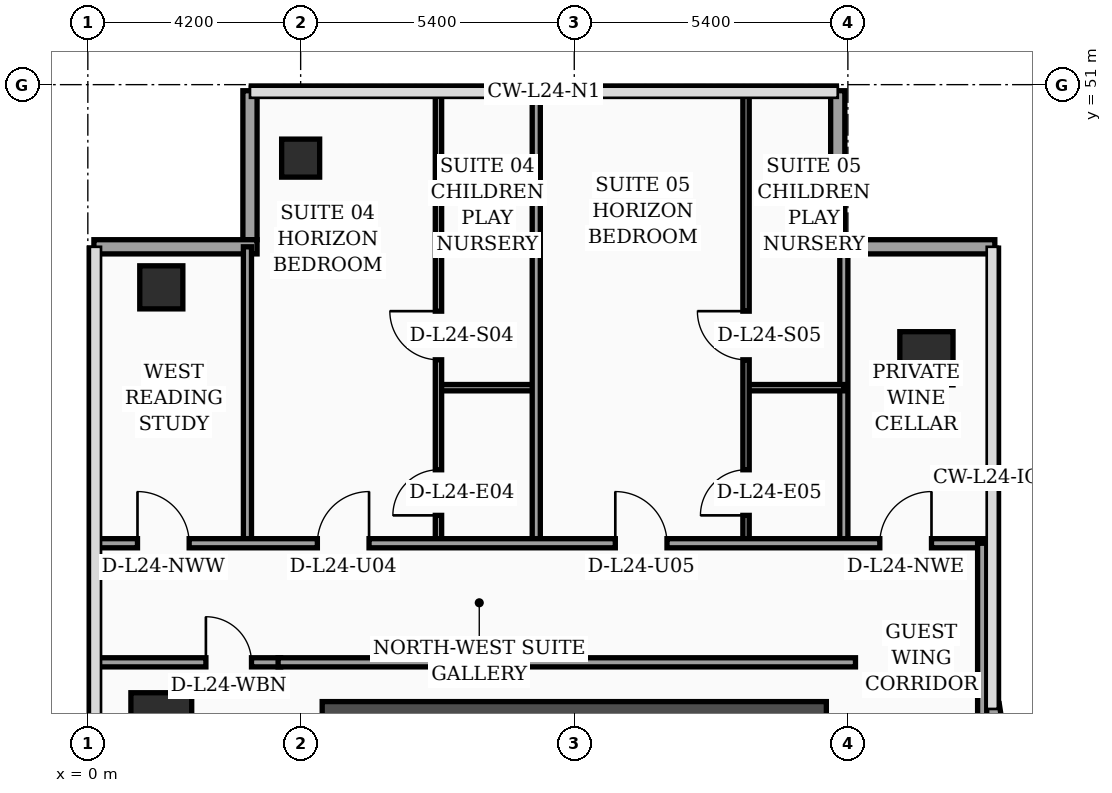
"""IFC4 building model, lengths in metres.
Left out: names, types, materials, properties, quantities, classifications, styles, units other than length and angle.
Written with IfcOpenShell. Run it as: python <this file> out.ifc"""

import sys

from ifc_helpers import new_model, si_unit, direction, frame, frame_2d, origin, origin_2d, place, context, subcontext, project, spatial, rectangle, hollow_rectangle, extrude, element, fill, save


model = new_model("IFC4")
c1 = context("Model", 3, precision=1e-05, world=origin(), true_north=direction((0.0, 1.0)))
c2 = subcontext(c1, "Body", "Model", "MODEL_VIEW")
j1 = project(units=[si_unit("LENGTHUNIT", "METRE"), si_unit("PLANEANGLEUNIT", "RADIAN")], contexts=[c1])
p1 = place(None, origin())
s1 = spatial("IfcSite", under=j1, at=p1, CompositionType="ELEMENT")
p2 = place(p1, origin())
s2 = spatial("IfcBuilding", under=s1, at=p2, CompositionType="ELEMENT")
p3 = place(p2, frame((0.0, 0.0, 101.2)))
s3 = spatial("IfcBuildingStorey", under=s2, at=p3, CompositionType="ELEMENT", Elevation=101.2)
p4 = place(p3, frame((4.625, 38.4, 0.0), z_axis=(0.0, 0.0, 1.0), x_axis=(1.0, 0.0, 0.0)))
e1 = element("IfcWall", 1, at=p4, inside=s3, PredefinedType="SHEAR", context=c2, shape_type="SweptSolid", body=[
    extrude(rectangle(XDim=9.95, YDim=0.85, at=frame_2d((4.975, 0.0))), origin(), (0.0, 0.0, 1.0), 3.56),
])
p5 = place(p3, frame((1.45, 38.4, 0.0), z_axis=(0.0, 0.0, 1.0), x_axis=(1.0, 0.0, 0.0)))
e2 = element("IfcColumn", 2, at=p5, inside=s3, PredefinedType="COLUMN", context=c2, shape_type="SweptSolid", body=[
    extrude(rectangle(XDim=1.2, YDim=1.2, at=origin_2d()), origin(), (0.0, 0.0, 1.0), 3.56),
])
p6 = place(p3, frame((1.45, 47.0, 0.0), z_axis=(0.0, 0.0, 1.0), x_axis=(1.0, 0.0, 0.0)))
e3 = element("IfcColumn", 3, at=p6, inside=s3, PredefinedType="COLUMN", context=c2, shape_type="SweptSolid", body=[
    extrude(hollow_rectangle(XDim=0.85, YDim=0.85, WallThickness=0.036, at=origin_2d()), origin(), (0.0, 0.0, 1.0), 3.56),
])
p7 = place(p3, frame((4.2, 49.55, 0.0), z_axis=(0.0, 0.0, 1.0), x_axis=(1.0, 0.0, 0.0)))
e4 = element("IfcColumn", 4, at=p7, inside=s3, PredefinedType="COLUMN", context=c2, shape_type="SweptSolid", body=[
    extrude(hollow_rectangle(XDim=0.75, YDim=0.75, WallThickness=0.032, at=origin_2d()), origin(), (0.0, 0.0, 1.0), 3.56),
])
p8 = place(p3, frame((16.55, 45.6, 0.0), z_axis=(0.0, 0.0, 1.0), x_axis=(1.0, 0.0, 0.0)))
e5 = element("IfcColumn", 5, at=p8, inside=s3, PredefinedType="COLUMN", context=c2, shape_type="SweptSolid", body=[
    extrude(rectangle(XDim=1.05, YDim=1.05, at=origin_2d()), origin(), (0.0, 0.0, 1.0), 3.56),
])
p9 = place(p3, frame((17.962, 38.03, 0.0), z_axis=(0.0, 0.0, 1.0), x_axis=(-0.15141125477, 0.988470855377, 0.0)))
e6 = element("IfcWall", 6, at=p9, inside=s3, PredefinedType="SOLIDWALL", context=c2, shape_type="SweptSolid", body=[
    extrude(rectangle(XDim=0.739, YDim=0.28, at=frame_2d((0.369, 0.0))), origin(), (0.0, 0.0, 1.0), 3.56),
])
p10 = place(p3, frame((17.9, 47.8, 0.0), z_axis=(0.0, 0.0, 1.0), x_axis=(-1.0, 0.0, 0.0)))
e7 = element("IfcWall", 7, at=p10, inside=s3, PredefinedType="SOLIDWALL", context=c2, shape_type="SweptSolid", body=[
    extrude(rectangle(XDim=3.24, YDim=0.28, at=frame_2d((1.62, 0.0))), origin(), (0.0, 0.0, 1.0), 3.56),
])
p11 = place(p3, frame((14.8, 47.94, 0.0), z_axis=(0.0, 0.0, 1.0), x_axis=(0.0, 1.0, 0.0)))
e8 = element("IfcWall", 8, at=p11, inside=s3, PredefinedType="SOLIDWALL", context=c2, shape_type="SweptSolid", body=[
    extrude(rectangle(XDim=2.94, YDim=0.28, at=frame_2d((1.47, 0.0))), origin(), (0.0, 0.0, 1.0), 3.56),
])
p12 = place(p3, frame((3.2, 50.88, 0.0), z_axis=(0.0, 0.0, 1.0), x_axis=(0.0, -1.0, 0.0)))
e9 = element("IfcWall", 9, at=p12, inside=s3, PredefinedType="SOLIDWALL", context=c2, shape_type="SweptSolid", body=[
    extrude(rectangle(XDim=2.94, YDim=0.28, at=frame_2d((1.47, 0.0))), origin(), (0.0, 0.0, 1.0), 3.04),
])
p13 = place(p3, frame((3.34, 47.8, 0.0), z_axis=(0.0, 0.0, 1.0), x_axis=(-1.0, 0.0, 0.0)))
e10 = element("IfcWall", 10, at=p13, inside=s3, PredefinedType="SOLIDWALL", context=c2, shape_type="SweptSolid", body=[
    extrude(rectangle(XDim=3.22, YDim=0.28, at=frame_2d((1.61, 0.0))), origin(), (0.0, 0.0, 1.0), 3.04),
])
p14 = place(p3, frame((0.08, 39.6, 0.0), z_axis=(0.0, 0.0, 1.0), x_axis=(1.0, 0.0, 0.0)))
e11 = element("IfcWall", 11, at=p14, inside=s3, PredefinedType="PARTITIONING", context=c2, shape_type="SweptSolid", body=[
    extrude(rectangle(XDim=3.725, YDim=0.18, at=frame_2d((1.862, 0.0))), origin(), (0.0, 0.0, 1.0), 2.84),
])
p15 = place(p14, frame((2.25, 0.0, 0.0)))
e12 = element("IfcOpeningElement", 12, at=p15, cuts=e11, PredefinedType="OPENING", context=c2, shape_type="SweptSolid", body=[
    extrude(rectangle(XDim=0.9, YDim=2.15, at=frame_2d((0.45, 1.075))), frame((0.0, 0.1, 0.0), z_axis=(0.0, -1.0, 0.0), x_axis=(1.0, 0.0, 0.0)), (0.0, 0.0, 1.0), 0.2),
])
p16 = place(p3, frame((3.15, 41.95, 0.0), z_axis=(0.0, 0.0, 1.0), x_axis=(0.0, 1.0, 0.0)))
e13 = element("IfcWall", 13, at=p16, inside=s3, PredefinedType="PARTITIONING", context=c2, shape_type="SweptSolid", body=[
    extrude(rectangle(XDim=5.85, YDim=0.16, at=frame_2d((2.925, 0.0))), origin(), (0.0, 0.0, 1.0), 3.14),
])
p17 = place(p3, frame((14.92, 41.95, 0.0), z_axis=(0.0, 0.0, 1.0), x_axis=(0.0, 1.0, 0.0)))
e14 = element("IfcWall", 14, at=p17, inside=s3, PredefinedType="PARTITIONING", context=c2, shape_type="SweptSolid", body=[
    extrude(rectangle(XDim=5.85, YDim=0.16, at=frame_2d((2.925, 0.0))), origin(), (0.0, 0.0, 1.0), 3.04),
])
p18 = place(p3, frame((6.92, 45.02, 0.0), z_axis=(0.0, 0.0, 1.0), x_axis=(1.0, 0.0, 0.0)))
e15 = element("IfcWall", 15, at=p18, inside=s3, PredefinedType="PARTITIONING", context=c2, shape_type="SweptSolid", body=[
    extrude(rectangle(XDim=1.93, YDim=0.125, at=frame_2d((0.965, 0.0))), origin(), (0.0, 0.0, 1.0), 3.56),
])
p19 = place(p3, frame((6.92, 41.95, 0.0), z_axis=(0.0, 0.0, 1.0), x_axis=(0.0, 1.0, 0.0)))
e16 = element("IfcWall", 16, at=p19, inside=s3, PredefinedType="PARTITIONING", context=c2, shape_type="SweptSolid", body=[
    extrude(rectangle(XDim=8.99, YDim=0.125, at=frame_2d((4.495, 0.0))), origin(), (0.0, 0.0, 1.0), 3.04),
])
p20 = place(p19, frame((0.55, 0.0, 0.0)))
e17 = element("IfcOpeningElement", 17, at=p20, cuts=e16, PredefinedType="OPENING", context=c2, shape_type="SweptSolid", body=[
    extrude(rectangle(XDim=0.9, YDim=2.15, at=frame_2d((0.45, 1.075))), frame((0.0, 0.073, 0.0), z_axis=(0.0, -1.0, 0.0), x_axis=(1.0, 0.0, 0.0)), (0.0, 0.0, 1.0), 0.145),
])
p21 = place(p19, frame((3.62, 0.0, 0.0)))
e18 = element("IfcOpeningElement", 18, at=p21, cuts=e16, PredefinedType="OPENING", context=c2, shape_type="SweptSolid", body=[
    extrude(rectangle(XDim=0.96, YDim=2.2, at=frame_2d((0.48, 1.1))), frame((0.0, 0.073, 0.0), z_axis=(0.0, -1.0, 0.0), x_axis=(1.0, 0.0, 0.0)), (0.0, 0.0, 1.0), 0.145),
])
p22 = place(p3, frame((12.99, 45.02, 0.0), z_axis=(0.0, 0.0, 1.0), x_axis=(1.0, 0.0, 0.0)))
e19 = element("IfcWall", 19, at=p22, inside=s3, PredefinedType="PARTITIONING", context=c2, shape_type="SweptSolid", body=[
    extrude(rectangle(XDim=1.93, YDim=0.125, at=frame_2d((0.965, 0.0))), origin(), (0.0, 0.0, 1.0), 3.56),
])
p23 = place(p3, frame((12.99, 41.95, 0.0), z_axis=(0.0, 0.0, 1.0), x_axis=(0.0, 1.0, 0.0)))
e20 = element("IfcWall", 20, at=p23, inside=s3, PredefinedType="PARTITIONING", context=c2, shape_type="SweptSolid", body=[
    extrude(rectangle(XDim=8.99, YDim=0.125, at=frame_2d((4.495, 0.0))), origin(), (0.0, 0.0, 1.0), 3.04),
])
p24 = place(p23, frame((0.55, 0.0, 0.0)))
e21 = element("IfcOpeningElement", 21, at=p24, cuts=e20, PredefinedType="OPENING", context=c2, shape_type="SweptSolid", body=[
    extrude(rectangle(XDim=0.9, YDim=2.15, at=frame_2d((0.45, 1.075))), frame((0.0, 0.073, 0.0), z_axis=(0.0, -1.0, 0.0), x_axis=(1.0, 0.0, 0.0)), (0.0, 0.0, 1.0), 0.145),
])
p25 = place(p23, frame((3.62, 0.0, 0.0)))
e22 = element("IfcOpeningElement", 22, at=p25, cuts=e20, PredefinedType="OPENING", context=c2, shape_type="SweptSolid", body=[
    extrude(rectangle(XDim=0.96, YDim=2.2, at=frame_2d((0.48, 1.1))), frame((0.0, 0.073, 0.0), z_axis=(0.0, -1.0, 0.0), x_axis=(1.0, 0.0, 0.0)), (0.0, 0.0, 1.0), 0.145),
])
p26 = place(p3, frame((8.85, 41.95, 0.0), z_axis=(0.0, 0.0, 1.0), x_axis=(0.0, 1.0, 0.0)))
e23 = element("IfcWall", 23, at=p26, inside=s3, PredefinedType="PARTITIONING", context=c2, shape_type="SweptSolid", body=[
    extrude(rectangle(XDim=8.99, YDim=0.16, at=frame_2d((4.495, 0.0))), origin(), (0.0, 0.0, 1.0), 3.04),
])
p27 = place(p3, frame((0.08, 41.95, 0.0), z_axis=(0.0, 0.0, 1.0), x_axis=(1.0, 0.0, 0.0)))
e24 = element("IfcWall", 24, at=p27, inside=s3, PredefinedType="PARTITIONING", context=c2, shape_type="SweptSolid", body=[
    extrude(rectangle(XDim=17.77, YDim=0.18, at=frame_2d((8.885, 0.0))), origin(), (0.0, 0.0, 1.0), 2.84),
])
p28 = place(p27, frame((0.9, 0.0, 0.0)))
e25 = element("IfcOpeningElement", 25, at=p28, cuts=e24, PredefinedType="OPENING", context=c2, shape_type="SweptSolid", body=[
    extrude(rectangle(XDim=1.02, YDim=2.2, at=frame_2d((0.51, 1.1))), frame((0.0, 0.1, 0.0), z_axis=(0.0, -1.0, 0.0), x_axis=(1.0, 0.0, 0.0)), (0.0, 0.0, 1.0), 0.2),
])
p29 = place(p27, frame((4.45, 0.0, 0.0)))
e26 = element("IfcOpeningElement", 26, at=p29, cuts=e24, PredefinedType="OPENING", context=c2, shape_type="SweptSolid", body=[
    extrude(rectangle(XDim=1.02, YDim=2.2, at=frame_2d((0.51, 1.1))), frame((0.0, 0.1, 0.0), z_axis=(0.0, -1.0, 0.0), x_axis=(1.0, 0.0, 0.0)), (0.0, 0.0, 1.0), 0.2),
])
p30 = place(p27, frame((10.33, 0.0, 0.0)))
e27 = element("IfcOpeningElement", 27, at=p30, cuts=e24, PredefinedType="OPENING", context=c2, shape_type="SweptSolid", body=[
    extrude(rectangle(XDim=1.02, YDim=2.2, at=frame_2d((0.51, 1.1))), frame((0.0, 0.1, 0.0), z_axis=(0.0, -1.0, 0.0), x_axis=(1.0, 0.0, 0.0)), (0.0, 0.0, 1.0), 0.2),
])
p31 = place(p27, frame((15.55, 0.0, 0.0)))
e28 = element("IfcOpeningElement", 28, at=p31, cuts=e24, PredefinedType="OPENING", context=c2, shape_type="SweptSolid", body=[
    extrude(rectangle(XDim=1.02, YDim=2.2, at=frame_2d((0.51, 1.1))), frame((0.0, 0.1, 0.0), z_axis=(0.0, -1.0, 0.0), x_axis=(1.0, 0.0, 0.0)), (0.0, 0.0, 1.0), 0.2),
])
p32 = place(p3, frame((17.65, 24.3, 0.0), z_axis=(0.0, 0.0, 1.0), x_axis=(0.0, 1.0, 0.0)))
e29 = element("IfcWall", 29, at=p32, inside=s3, PredefinedType="PARTITIONING", context=c2, shape_type="SweptSolid", body=[
    extrude(rectangle(XDim=17.65, YDim=0.18, at=frame_2d((8.825, 0.0))), origin(), (0.0, 0.0, 1.0), 2.84),
])
p33 = place(p3, frame((3.755, 39.6, 0.0), z_axis=(0.0, 0.0, 1.0), x_axis=(1.0, 0.0, 0.0)))
e30 = element("IfcWall", 30, at=p33, inside=s3, PredefinedType="PARTITIONING", context=c2, shape_type="SweptSolid", body=[
    extrude(rectangle(XDim=11.395, YDim=0.18, at=frame_2d((5.698, 0.0))), origin(), (0.0, 0.0, 1.0), 2.84),
])
p34 = place(p15, origin())
e31 = element("IfcDoor", 31, at=p34, inside=s3, OperationType="SINGLE_SWING_LEFT", PredefinedType="DOOR", context=c2, shape_type="SweptSolid", body=[
    extrude(rectangle(XDim=0.9, YDim=2.15, at=frame_2d((0.45, 1.075))), frame((0.0, 0.025, 0.0), z_axis=(0.0, -1.0, 0.0), x_axis=(1.0, 0.0, 0.0)), (0.0, 0.0, 1.0), 0.05),
])
fill(e12, e31)
p35 = place(p20, origin())
e32 = element("IfcDoor", 32, at=p35, inside=s3, OperationType="SINGLE_SWING_LEFT", PredefinedType="DOOR", context=c2, shape_type="SweptSolid", body=[
    extrude(rectangle(XDim=0.9, YDim=2.15, at=frame_2d((0.45, 1.075))), frame((0.0, 0.025, 0.0), z_axis=(0.0, -1.0, 0.0), x_axis=(1.0, 0.0, 0.0)), (0.0, 0.0, 1.0), 0.05),
])
fill(e17, e32)
p36 = place(p21, origin())
e33 = element("IfcDoor", 33, at=p36, inside=s3, OperationType="SINGLE_SWING_RIGHT", PredefinedType="DOOR", context=c2, shape_type="SweptSolid", body=[
    extrude(rectangle(XDim=0.96, YDim=2.2, at=frame_2d((0.48, 1.1))), frame((0.0, 0.025, 0.0), z_axis=(0.0, -1.0, 0.0), x_axis=(1.0, 0.0, 0.0)), (0.0, 0.0, 1.0), 0.05),
])
fill(e18, e33)
p37 = place(p24, origin())
e34 = element("IfcDoor", 34, at=p37, inside=s3, OperationType="SINGLE_SWING_LEFT", PredefinedType="DOOR", context=c2, shape_type="SweptSolid", body=[
    extrude(rectangle(XDim=0.9, YDim=2.15, at=frame_2d((0.45, 1.075))), frame((0.0, 0.025, 0.0), z_axis=(0.0, -1.0, 0.0), x_axis=(1.0, 0.0, 0.0)), (0.0, 0.0, 1.0), 0.05),
])
fill(e21, e34)
p38 = place(p25, origin())
e35 = element("IfcDoor", 35, at=p38, inside=s3, OperationType="SINGLE_SWING_RIGHT", PredefinedType="DOOR", context=c2, shape_type="SweptSolid", body=[
    extrude(rectangle(XDim=0.96, YDim=2.2, at=frame_2d((0.48, 1.1))), frame((0.0, 0.025, 0.0), z_axis=(0.0, -1.0, 0.0), x_axis=(1.0, 0.0, 0.0)), (0.0, 0.0, 1.0), 0.05),
])
fill(e22, e35)
p39 = place(p28, origin())
e36 = element("IfcDoor", 36, at=p39, inside=s3, OperationType="SINGLE_SWING_LEFT", PredefinedType="DOOR", context=c2, shape_type="SweptSolid", body=[
    extrude(rectangle(XDim=1.02, YDim=2.2, at=frame_2d((0.51, 1.1))), frame((0.0, 0.025, 0.0), z_axis=(0.0, -1.0, 0.0), x_axis=(1.0, 0.0, 0.0)), (0.0, 0.0, 1.0), 0.05),
])
fill(e25, e36)
p40 = place(p29, origin())
e37 = element("IfcDoor", 37, at=p40, inside=s3, OperationType="SINGLE_SWING_RIGHT", PredefinedType="DOOR", context=c2, shape_type="SweptSolid", body=[
    extrude(rectangle(XDim=1.02, YDim=2.2, at=frame_2d((0.51, 1.1))), frame((0.0, 0.025, 0.0), z_axis=(0.0, -1.0, 0.0), x_axis=(1.0, 0.0, 0.0)), (0.0, 0.0, 1.0), 0.05),
])
fill(e26, e37)
p41 = place(p30, origin())
e38 = element("IfcDoor", 38, at=p41, inside=s3, OperationType="SINGLE_SWING_LEFT", PredefinedType="DOOR", context=c2, shape_type="SweptSolid", body=[
    extrude(rectangle(XDim=1.02, YDim=2.2, at=frame_2d((0.51, 1.1))), frame((0.0, 0.025, 0.0), z_axis=(0.0, -1.0, 0.0), x_axis=(1.0, 0.0, 0.0)), (0.0, 0.0, 1.0), 0.05),
])
fill(e27, e38)
p42 = place(p31, origin())
e39 = element("IfcDoor", 39, at=p42, inside=s3, OperationType="SINGLE_SWING_RIGHT", PredefinedType="DOOR", context=c2, shape_type="SweptSolid", body=[
    extrude(rectangle(XDim=1.02, YDim=2.2, at=frame_2d((0.51, 1.1))), frame((0.0, 0.025, 0.0), z_axis=(0.0, -1.0, 0.0), x_axis=(1.0, 0.0, 0.0)), (0.0, 0.0, 1.0), 0.05),
])
fill(e28, e39)
save(model, sys.argv[1])
